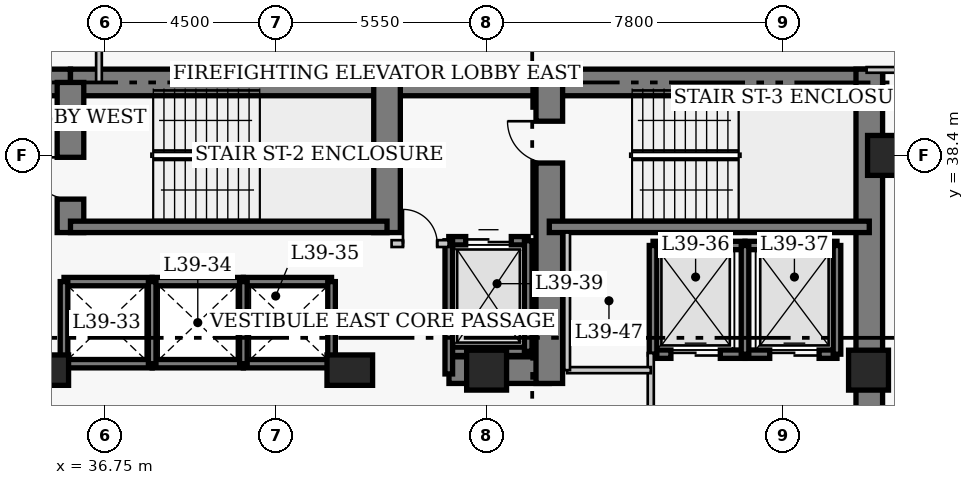
"""IFC4 building model, lengths in metres.
Left out: names, types, materials, properties, quantities, classifications, styles, units other than length and angle.
Written with IfcOpenShell. Run it as: python <this file> out.ifc"""

import sys

from ifc_helpers import new_model, si_unit, direction, frame, frame_2d, origin, origin_2d, place, context, subcontext, project, spatial, rectangle, extrude, element, fill, save


model = new_model("IFC4")
c1 = context("Model", 3, precision=1e-05, world=origin(), true_north=direction((0.0, 1.0)))
c2 = subcontext(c1, "Body", "Model", "MODEL_VIEW")
j1 = project(units=[si_unit("LENGTHUNIT", "METRE"), si_unit("PLANEANGLEUNIT", "RADIAN")], contexts=[c1])
p1 = place(None, origin())
s1 = spatial("IfcSite", under=j1, at=p1, CompositionType="ELEMENT")
p2 = place(p1, origin())
s2 = spatial("IfcBuilding", under=s1, at=p2, CompositionType="ELEMENT")
p3 = place(p2, frame((0.0, 0.0, 157.4)))
s3 = spatial("IfcBuildingStorey", under=s2, at=p3, CompositionType="ELEMENT", Elevation=157.4)
p4 = place(p3, frame((21.55, 40.32, 0.0), z_axis=(0.0, 0.0, 1.0), x_axis=(1.0, 0.0, 0.0)))
e1 = element("IfcWall", 1, at=p4, inside=s3, PredefinedType="SHEAR", context=c2, shape_type="SweptSolid", body=[
    extrude(rectangle(XDim=14.3, YDim=0.7, at=frame_2d((7.15, 0.0))), origin(), (0.0, 0.0, 1.0), 3.8),
])
p5 = place(p3, frame((35.85, 40.32, 0.0), z_axis=(0.0, 0.0, 1.0), x_axis=(1.0, 0.0, 0.0)))
e2 = element("IfcWall", 2, at=p5, inside=s3, PredefinedType="SHEAR", context=c2, shape_type="SweptSolid", body=[
    extrude(rectangle(XDim=12.6, YDim=0.7, at=frame_2d((6.3, 0.0))), origin(), (0.0, 0.0, 1.0), 3.8),
])
p6 = place(p3, frame((48.45, 40.32, 0.0), z_axis=(0.0, 0.0, 1.0), x_axis=(1.0, 0.0, 0.0)))
e3 = element("IfcWall", 3, at=p6, inside=s3, PredefinedType="SHEAR", context=c2, shape_type="SweptSolid", body=[
    extrude(rectangle(XDim=8.77, YDim=0.7, at=frame_2d((4.385, 0.0))), origin(), (0.0, 0.0, 1.0), 3.8),
])
p7 = place(p3, frame((56.87, 27.05, 0.0), z_axis=(0.0, 0.0, 1.0), x_axis=(0.0, 1.0, 0.0)))
e4 = element("IfcWall", 4, at=p7, inside=s3, PredefinedType="SHEAR", context=c2, shape_type="SweptSolid", body=[
    extrude(rectangle(XDim=13.62, YDim=0.7, at=frame_2d((6.81, 0.0))), origin(), (0.0, 0.0, 1.0), 3.8),
])
p8 = place(p3, frame((45.81, 32.75, 0.0), z_axis=(0.0, 0.0, 1.0), x_axis=(1.0, 0.0, 0.0)))
e5 = element("IfcWall", 5, at=p8, inside=s3, PredefinedType="SHEAR", context=c2, shape_type="SweptSolid", body=[
    extrude(rectangle(XDim=2.64, YDim=0.7, at=frame_2d((1.32, 0.0))), origin(), (0.0, 0.0, 1.0), 3.8),
])
p9 = place(p3, frame((35.85, 36.37, 0.0), z_axis=(0.0, 0.0, 1.0), x_axis=(0.0, 1.0, 0.0)))
e6 = element("IfcWall", 6, at=p9, inside=s3, PredefinedType="SHEAR", context=c2, shape_type="SweptSolid", body=[
    extrude(rectangle(XDim=3.95, YDim=0.7, at=frame_2d((1.975, 0.0))), origin(), (0.0, 0.0, 1.0), 3.8),
])
p10 = place(p9, frame((0.88, 0.0, 0.0)))
e7 = element("IfcOpeningElement", 7, at=p10, cuts=e6, PredefinedType="OPENING", context=c2, shape_type="SweptSolid", body=[
    extrude(rectangle(XDim=1.1, YDim=2.15, at=frame_2d((0.55, 1.075))), frame((0.0, 0.36, 0.0), z_axis=(0.0, -1.0, 0.0), x_axis=(1.0, 0.0, 0.0)), (0.0, 0.0, 1.0), 0.72),
])
p11 = place(p3, frame((44.18, 36.37, 0.0), z_axis=(0.0, 0.0, 1.0), x_axis=(0.0, 1.0, 0.0)))
e8 = element("IfcWall", 8, at=p11, inside=s3, PredefinedType="SHEAR", context=c2, shape_type="SweptSolid", body=[
    extrude(rectangle(XDim=3.95, YDim=0.7, at=frame_2d((1.975, 0.0))), origin(), (0.0, 0.0, 1.0), 3.8),
])
p12 = place(p3, frame((48.45, 32.4, 0.0), z_axis=(0.0, 0.0, 1.0), x_axis=(0.0, 1.0, 0.0)))
e9 = element("IfcWall", 9, at=p12, inside=s3, PredefinedType="SHEAR", context=c2, shape_type="SweptSolid", body=[
    extrude(rectangle(XDim=7.92, YDim=0.7, at=frame_2d((3.96, 0.0))), origin(), (0.0, 0.0, 1.0), 3.8),
])
p13 = place(p12, frame((5.8, 0.0, 0.0)))
e10 = element("IfcOpeningElement", 10, at=p13, cuts=e9, PredefinedType="OPENING", context=c2, shape_type="SweptSolid", body=[
    extrude(rectangle(XDim=1.1, YDim=2.15, at=frame_2d((0.55, 1.075))), frame((0.0, 0.36, 0.0), z_axis=(0.0, -1.0, 0.0), x_axis=(1.0, 0.0, 0.0)), (0.0, 0.0, 1.0), 0.72),
])
p14 = place(p3, frame((35.85, 36.52, 0.0), z_axis=(0.0, 0.0, 1.0), x_axis=(1.0, 0.0, 0.0)))
e11 = element("IfcWall", 11, at=p14, inside=s3, PredefinedType="SHEAR", context=c2, shape_type="SweptSolid", body=[
    extrude(rectangle(XDim=8.33, YDim=0.3, at=frame_2d((4.165, 0.0))), origin(), (0.0, 0.0, 1.0), 3.8),
])
p15 = place(p3, frame((48.45, 36.52, 0.0), z_axis=(0.0, 0.0, 1.0), x_axis=(1.0, 0.0, 0.0)))
e12 = element("IfcWall", 12, at=p15, inside=s3, PredefinedType="SHEAR", context=c2, shape_type="SweptSolid", body=[
    extrude(rectangle(XDim=8.42, YDim=0.3, at=frame_2d((4.21, 0.0))), origin(), (0.0, 0.0, 1.0), 3.8),
])
p16 = place(p3, frame((57.35, 38.4, 0.0), z_axis=(0.0, 0.0, 1.0), x_axis=(1.0, 0.0, 0.0)))
e13 = element("IfcColumn", 13, at=p16, inside=s3, PredefinedType="COLUMN", context=c2, shape_type="SweptSolid", body=[
    extrude(rectangle(XDim=1.05, YDim=1.05, at=origin_2d()), origin(), (0.0, 0.0, 1.0), 3.8),
])
for number, where, z_axis, x_axis in (
    (14, (35.2, 32.75, 0.0), (0.0, 0.0, 1.0), (1.0, 0.0, 0.0)),
    (15, (43.2, 32.75, 0.0), (0.0, 0.0, 1.0), (1.0, 0.0, 0.0)),
):
    element("IfcColumn", number, at=place(p3, frame(where, z_axis=z_axis, x_axis=x_axis)), inside=s3, PredefinedType="COLUMN", context=c2, shape_type="SweptSolid", body=[
        extrude(rectangle(XDim=1.2, YDim=0.8, at=origin_2d()), origin(), (0.0, 0.0, 1.0), 3.8),
    ])
for number, where, z_axis, x_axis in (
    (16, (46.8, 32.75, 0.0), (0.0, 0.0, 1.0), (1.0, 0.0, 0.0)),
    (17, (56.85, 32.75, 0.0), (0.0, 0.0, 1.0), (1.0, 0.0, 0.0)),
):
    element("IfcColumn", number, at=place(p3, frame(where, z_axis=z_axis, x_axis=x_axis)), inside=s3, PredefinedType="COLUMN", context=c2, shape_type="SweptSolid", body=[
        extrude(rectangle(XDim=1.05, YDim=1.05, at=origin_2d()), origin(), (0.0, 0.0, 1.0), 3.8),
    ])
for number, where, z_axis, x_axis in (
    (18, (35.68, 35.08, 0.0), (0.0, 0.0, 1.0), (1.0, 0.0, 0.0)),
    (19, (35.68, 32.92, 0.0), (0.0, 0.0, 1.0), (1.0, 0.0, 0.0)),
):
    element("IfcWall", number, at=place(p3, frame(where, z_axis=z_axis, x_axis=x_axis)), inside=s3, PredefinedType="SHEAR", context=c2, shape_type="SweptSolid", body=[
        extrude(rectangle(XDim=2.32, YDim=0.22, at=frame_2d((1.16, 0.0))), origin(), (0.0, 0.0, 1.0), 3.8),
    ])
p17 = place(p3, frame((35.68, 32.92, 0.0), z_axis=(0.0, 0.0, 1.0), x_axis=(0.0, 1.0, 0.0)))
e20 = element("IfcWall", 20, at=p17, inside=s3, PredefinedType="SHEAR", context=c2, shape_type="SweptSolid", body=[
    extrude(rectangle(XDim=2.16, YDim=0.2, at=frame_2d((1.08, 0.0))), origin(), (0.0, 0.0, 1.0), 3.8),
])
for number, where, z_axis, x_axis in (
    (21, (38.0, 35.08, 0.0), (0.0, 0.0, 1.0), (1.0, 0.0, 0.0)),
    (22, (38.0, 32.92, 0.0), (0.0, 0.0, 1.0), (1.0, 0.0, 0.0)),
):
    element("IfcWall", number, at=place(p3, frame(where, z_axis=z_axis, x_axis=x_axis)), inside=s3, PredefinedType="SHEAR", context=c2, shape_type="SweptSolid", body=[
        extrude(rectangle(XDim=2.4, YDim=0.22, at=frame_2d((1.2, 0.0))), origin(), (0.0, 0.0, 1.0), 3.8),
    ])
p18 = place(p3, frame((38.0, 32.92, 0.0), z_axis=(0.0, 0.0, 1.0), x_axis=(0.0, 1.0, 0.0)))
e23 = element("IfcWall", 23, at=p18, inside=s3, PredefinedType="SHEAR", context=c2, shape_type="SweptSolid", body=[
    extrude(rectangle(XDim=2.16, YDim=0.2, at=frame_2d((1.08, 0.0))), origin(), (0.0, 0.0, 1.0), 3.8),
])
for number, where, z_axis, x_axis in (
    (24, (40.4, 35.08, 0.0), (0.0, 0.0, 1.0), (1.0, 0.0, 0.0)),
    (25, (40.4, 32.92, 0.0), (0.0, 0.0, 1.0), (1.0, 0.0, 0.0)),
):
    element("IfcWall", number, at=place(p3, frame(where, z_axis=z_axis, x_axis=x_axis)), inside=s3, PredefinedType="SHEAR", context=c2, shape_type="SweptSolid", body=[
        extrude(rectangle(XDim=2.32, YDim=0.22, at=frame_2d((1.16, 0.0))), origin(), (0.0, 0.0, 1.0), 3.8),
    ])
for number, where, z_axis, x_axis in (
    (26, (40.4, 32.92, 0.0), (0.0, 0.0, 1.0), (0.0, 1.0, 0.0)),
    (27, (42.72, 32.92, 0.0), (0.0, 0.0, 1.0), (0.0, 1.0, 0.0)),
):
    element("IfcWall", number, at=place(p3, frame(where, z_axis=z_axis, x_axis=x_axis)), inside=s3, PredefinedType="SHEAR", context=c2, shape_type="SweptSolid", body=[
        extrude(rectangle(XDim=2.16, YDim=0.2, at=frame_2d((1.08, 0.0))), origin(), (0.0, 0.0, 1.0), 3.8),
    ])
p19 = place(p3, frame((51.18, 36.03, 0.0), z_axis=(0.0, 0.0, 1.0), x_axis=(1.0, 0.0, 0.0)))
e28 = element("IfcWall", 28, at=p19, inside=s3, PredefinedType="SHEAR", context=c2, shape_type="SweptSolid", body=[
    extrude(rectangle(XDim=2.42, YDim=0.22, at=frame_2d((1.21, 0.0))), origin(), (0.0, 0.0, 1.0), 3.8),
])
p20 = place(p3, frame((51.18, 33.17, 0.0), z_axis=(0.0, 0.0, 1.0), x_axis=(1.0, 0.0, 0.0)))
e29 = element("IfcWall", 29, at=p20, inside=s3, PredefinedType="SHEAR", context=c2, shape_type="SweptSolid", body=[
    extrude(rectangle(XDim=2.42, YDim=0.22, at=frame_2d((1.21, 0.0))), origin(), (0.0, 0.0, 1.0), 3.8),
])
p21 = place(p20, frame((0.47, 0.0, 0.0)))
e30 = element("IfcOpeningElement", 30, at=p21, cuts=e29, PredefinedType="OPENING", context=c2, shape_type="SweptSolid", body=[
    extrude(rectangle(XDim=1.3, YDim=2.15, at=frame_2d((0.65, 1.075))), frame((0.0, 0.12, 0.0), z_axis=(0.0, -1.0, 0.0), x_axis=(1.0, 0.0, 0.0)), (0.0, 0.0, 1.0), 0.24),
])
p22 = place(p3, frame((51.18, 33.17, 0.0), z_axis=(0.0, 0.0, 1.0), x_axis=(0.0, 1.0, 0.0)))
e31 = element("IfcWall", 31, at=p22, inside=s3, PredefinedType="SHEAR", context=c2, shape_type="SweptSolid", body=[
    extrude(rectangle(XDim=2.86, YDim=0.2, at=frame_2d((1.43, 0.0))), origin(), (0.0, 0.0, 1.0), 3.8),
])
p23 = place(p3, frame((53.6, 36.03, 0.0), z_axis=(0.0, 0.0, 1.0), x_axis=(1.0, 0.0, 0.0)))
e32 = element("IfcWall", 32, at=p23, inside=s3, PredefinedType="SHEAR", context=c2, shape_type="SweptSolid", body=[
    extrude(rectangle(XDim=2.42, YDim=0.22, at=frame_2d((1.21, 0.0))), origin(), (0.0, 0.0, 1.0), 3.8),
])
p24 = place(p3, frame((53.6, 33.17, 0.0), z_axis=(0.0, 0.0, 1.0), x_axis=(1.0, 0.0, 0.0)))
e33 = element("IfcWall", 33, at=p24, inside=s3, PredefinedType="SHEAR", context=c2, shape_type="SweptSolid", body=[
    extrude(rectangle(XDim=2.42, YDim=0.22, at=frame_2d((1.21, 0.0))), origin(), (0.0, 0.0, 1.0), 3.8),
])
p25 = place(p24, frame((0.65, 0.0, 0.0)))
e34 = element("IfcOpeningElement", 34, at=p25, cuts=e33, PredefinedType="OPENING", context=c2, shape_type="SweptSolid", body=[
    extrude(rectangle(XDim=1.3, YDim=2.15, at=frame_2d((0.65, 1.075))), frame((0.0, 0.12, 0.0), z_axis=(0.0, -1.0, 0.0), x_axis=(1.0, 0.0, 0.0)), (0.0, 0.0, 1.0), 0.24),
])
for number, where, z_axis, x_axis in (
    (35, (53.6, 33.17, 0.0), (0.0, 0.0, 1.0), (0.0, 1.0, 0.0)),
    (36, (56.02, 33.17, 0.0), (0.0, 0.0, 1.0), (0.0, 1.0, 0.0)),
):
    element("IfcWall", number, at=place(p3, frame(where, z_axis=z_axis, x_axis=x_axis)), inside=s3, PredefinedType="SHEAR", context=c2, shape_type="SweptSolid", body=[
        extrude(rectangle(XDim=2.86, YDim=0.2, at=frame_2d((1.43, 0.0))), origin(), (0.0, 0.0, 1.0), 3.8),
    ])
p26 = place(p3, frame((45.805, 36.155, 0.0), z_axis=(0.0, 0.0, 1.0), x_axis=(1.0, 0.0, 0.0)))
e37 = element("IfcWall", 37, at=p26, inside=s3, PredefinedType="SHEAR", context=c2, shape_type="SweptSolid", body=[
    extrude(rectangle(XDim=2.09, YDim=0.22, at=frame_2d((1.045, 0.0))), origin(), (0.0, 0.0, 1.0), 3.8),
])
p27 = place(p26, frame((0.445, 0.0, 0.0)))
e38 = element("IfcOpeningElement", 38, at=p27, cuts=e37, PredefinedType="OPENING", context=c2, shape_type="SweptSolid", body=[
    extrude(rectangle(XDim=1.2, YDim=2.15, at=frame_2d((0.6, 1.075))), frame((0.0, 0.12, 0.0), z_axis=(0.0, -1.0, 0.0), x_axis=(1.0, 0.0, 0.0)), (0.0, 0.0, 1.0), 0.24),
])
p28 = place(p3, frame((45.805, 33.245, 0.0), z_axis=(0.0, 0.0, 1.0), x_axis=(1.0, 0.0, 0.0)))
e39 = element("IfcWall", 39, at=p28, inside=s3, PredefinedType="SHEAR", context=c2, shape_type="SweptSolid", body=[
    extrude(rectangle(XDim=2.09, YDim=0.22, at=frame_2d((1.045, 0.0))), origin(), (0.0, 0.0, 1.0), 3.8),
])
p29 = place(p3, frame((45.805, 32.65, 0.0), z_axis=(0.0, 0.0, 1.0), x_axis=(0.0, 1.0, 0.0)))
e40 = element("IfcWall", 40, at=p29, inside=s3, PredefinedType="SHEAR", context=c2, shape_type="SweptSolid", body=[
    extrude(rectangle(XDim=3.505, YDim=0.2, at=frame_2d((1.752, 0.0))), origin(), (0.0, 0.0, 1.0), 3.8),
])
p30 = place(p3, frame((47.895, 33.245, 0.0), z_axis=(0.0, 0.0, 1.0), x_axis=(0.0, 1.0, 0.0)))
e41 = element("IfcWall", 41, at=p30, inside=s3, PredefinedType="SHEAR", context=c2, shape_type="SweptSolid", body=[
    extrude(rectangle(XDim=2.91, YDim=0.2, at=frame_2d((1.455, 0.0))), origin(), (0.0, 0.0, 1.0), 3.8),
])
p31 = place(p3, frame((44.3, 36.08, 0.0), z_axis=(0.0, 0.0, 1.0), x_axis=(1.0, 0.0, 0.0)))
e42 = element("IfcWall", 42, at=p31, inside=s3, PredefinedType="PARTITIONING", context=c2, shape_type="SweptSolid", body=[
    extrude(rectangle(XDim=1.5, YDim=0.18, at=frame_2d((0.75, 0.0))), origin(), (0.0, 0.0, 1.0), 3.55),
])
p32 = place(p31, frame((0.3, 0.0, 0.0)))
e43 = element("IfcOpeningElement", 43, at=p32, cuts=e42, PredefinedType="OPENING", context=c2, shape_type="SweptSolid", body=[
    extrude(rectangle(XDim=0.9, YDim=2.15, at=frame_2d((0.45, 1.075))), frame((0.0, 0.1, 0.0), z_axis=(0.0, -1.0, 0.0), x_axis=(1.0, 0.0, 0.0)), (0.0, 0.0, 1.0), 0.2),
])
p33 = place(p3, frame((51.12, 29.5, 0.0), z_axis=(0.0, 0.0, 1.0), x_axis=(0.0, 1.0, 0.0)))
e44 = element("IfcWall", 44, at=p33, inside=s3, PredefinedType="PARTITIONING", context=c2, shape_type="SweptSolid", body=[
    extrude(rectangle(XDim=3.7, YDim=0.16, at=frame_2d((1.85, 0.0))), origin(), (0.0, 0.0, 1.0), 3.55),
])
p34 = place(p33, frame((0.9, 0.0, 0.0)))
e45 = element("IfcOpeningElement", 45, at=p34, cuts=e44, PredefinedType="OPENING", context=c2, shape_type="SweptSolid", body=[
    extrude(rectangle(XDim=1.1, YDim=2.15, at=frame_2d((0.55, 1.075))), frame((0.0, 0.09, 0.0), z_axis=(0.0, -1.0, 0.0), x_axis=(1.0, 0.0, 0.0)), (0.0, 0.0, 1.0), 0.18),
])
p35 = place(p3, frame((48.92, 32.75, 0.0), z_axis=(0.0, 0.0, 1.0), x_axis=(1.0, 0.0, 0.0)))
e46 = element("IfcWall", 46, at=p35, inside=s3, PredefinedType="PARTITIONING", context=c2, shape_type="SweptSolid", body=[
    extrude(rectangle(XDim=2.2, YDim=0.16, at=frame_2d((1.1, 0.0))), origin(), (0.0, 0.0, 1.0), 3.55),
])
p36 = place(p3, frame((48.92, 32.75, 0.0), z_axis=(0.0, 0.0, 1.0), x_axis=(0.0, 1.0, 0.0)))
e47 = element("IfcWall", 47, at=p36, inside=s3, PredefinedType="PARTITIONING", context=c2, shape_type="SweptSolid", body=[
    extrude(rectangle(XDim=3.62, YDim=0.15, at=frame_2d((1.81, 0.0))), origin(), (0.0, 0.0, 1.0), 3.55),
])
p37 = place(p3, frame((56.8, 40.65, 0.0), z_axis=(0.0, 0.0, 1.0), x_axis=(1.0, 0.0, 0.0)))
e48 = element("IfcWall", 48, at=p37, inside=s3, PredefinedType="PARTITIONING", context=c2, shape_type="SweptSolid", body=[
    extrude(rectangle(XDim=4.66, YDim=0.15, at=frame_2d((2.33, 0.0))), origin(), (0.0, 0.0, 1.0), 3.55),
])
p38 = place(p37, frame((3.05, 0.0, 0.0)))
e49 = element("IfcOpeningElement", 49, at=p38, cuts=e48, PredefinedType="OPENING", context=c2, shape_type="SweptSolid", body=[
    extrude(rectangle(XDim=1.0, YDim=2.15, at=frame_2d((0.5, 1.075))), frame((0.0, 0.085, 0.0), z_axis=(0.0, -1.0, 0.0), x_axis=(1.0, 0.0, 0.0)), (0.0, 0.0, 1.0), 0.17),
])
p39 = place(p3, frame((36.6, 40.32, 0.0), z_axis=(0.0, 0.0, 1.0), x_axis=(0.0, 1.0, 0.0)))
e50 = element("IfcWall", 50, at=p39, inside=s3, PredefinedType="PARTITIONING", context=c2, shape_type="SweptSolid", body=[
    extrude(rectangle(XDim=1.845, YDim=0.15, at=frame_2d((0.922, 0.0))), origin(), (0.0, 0.0, 1.0), 3.55),
])
p40 = place(p21, origin())
e51 = element("IfcDoor", 51, at=p40, inside=s3, OperationType="DOUBLE_DOOR_SLIDING", PredefinedType="DOOR", context=c2, shape_type="SweptSolid", body=[
    extrude(rectangle(XDim=1.3, YDim=2.15, at=frame_2d((0.65, 1.075))), frame((0.0, 0.025, 0.0), z_axis=(0.0, -1.0, 0.0), x_axis=(1.0, 0.0, 0.0)), (0.0, 0.0, 1.0), 0.05),
])
fill(e30, e51)
p41 = place(p25, origin())
e52 = element("IfcDoor", 52, at=p41, inside=s3, OperationType="DOUBLE_DOOR_SLIDING", PredefinedType="DOOR", context=c2, shape_type="SweptSolid", body=[
    extrude(rectangle(XDim=1.3, YDim=2.15, at=frame_2d((0.65, 1.075))), frame((0.0, 0.025, 0.0), z_axis=(0.0, -1.0, 0.0), x_axis=(1.0, 0.0, 0.0)), (0.0, 0.0, 1.0), 0.05),
])
fill(e34, e52)
p42 = place(p27, origin())
e53 = element("IfcDoor", 53, at=p42, inside=s3, OperationType="DOUBLE_DOOR_SLIDING", PredefinedType="DOOR", context=c2, shape_type="SweptSolid", body=[
    extrude(rectangle(XDim=1.2, YDim=2.15, at=frame_2d((0.6, 1.075))), frame((0.0, 0.025, 0.0), z_axis=(0.0, -1.0, 0.0), x_axis=(1.0, 0.0, 0.0)), (0.0, 0.0, 1.0), 0.05),
])
fill(e38, e53)
p43 = place(p32, origin())
e54 = element("IfcDoor", 54, at=p43, inside=s3, OperationType="SINGLE_SWING_LEFT", PredefinedType="DOOR", context=c2, shape_type="SweptSolid", body=[
    extrude(rectangle(XDim=0.9, YDim=2.15, at=frame_2d((0.45, 1.075))), frame((0.0, 0.025, 0.0), z_axis=(0.0, -1.0, 0.0), x_axis=(1.0, 0.0, 0.0)), (0.0, 0.0, 1.0), 0.05),
])
fill(e43, e54)
p44 = place(p10, origin())
e55 = element("IfcDoor", 55, at=p44, inside=s3, OperationType="SINGLE_SWING_RIGHT", PredefinedType="DOOR", context=c2, shape_type="SweptSolid", body=[
    extrude(rectangle(XDim=1.1, YDim=2.15, at=frame_2d((0.55, 1.075))), frame((0.0, 0.025, 0.0), z_axis=(0.0, -1.0, 0.0), x_axis=(1.0, 0.0, 0.0)), (0.0, 0.0, 1.0), 0.05),
])
fill(e7, e55)
p45 = place(p13, origin())
e56 = element("IfcDoor", 56, at=p45, inside=s3, OperationType="SINGLE_SWING_RIGHT", PredefinedType="DOOR", context=c2, shape_type="SweptSolid", body=[
    extrude(rectangle(XDim=1.1, YDim=2.15, at=frame_2d((0.55, 1.075))), frame((0.0, 0.025, 0.0), z_axis=(0.0, -1.0, 0.0), x_axis=(1.0, 0.0, 0.0)), (0.0, 0.0, 1.0), 0.05),
])
fill(e10, e56)
save(model, sys.argv[1])
